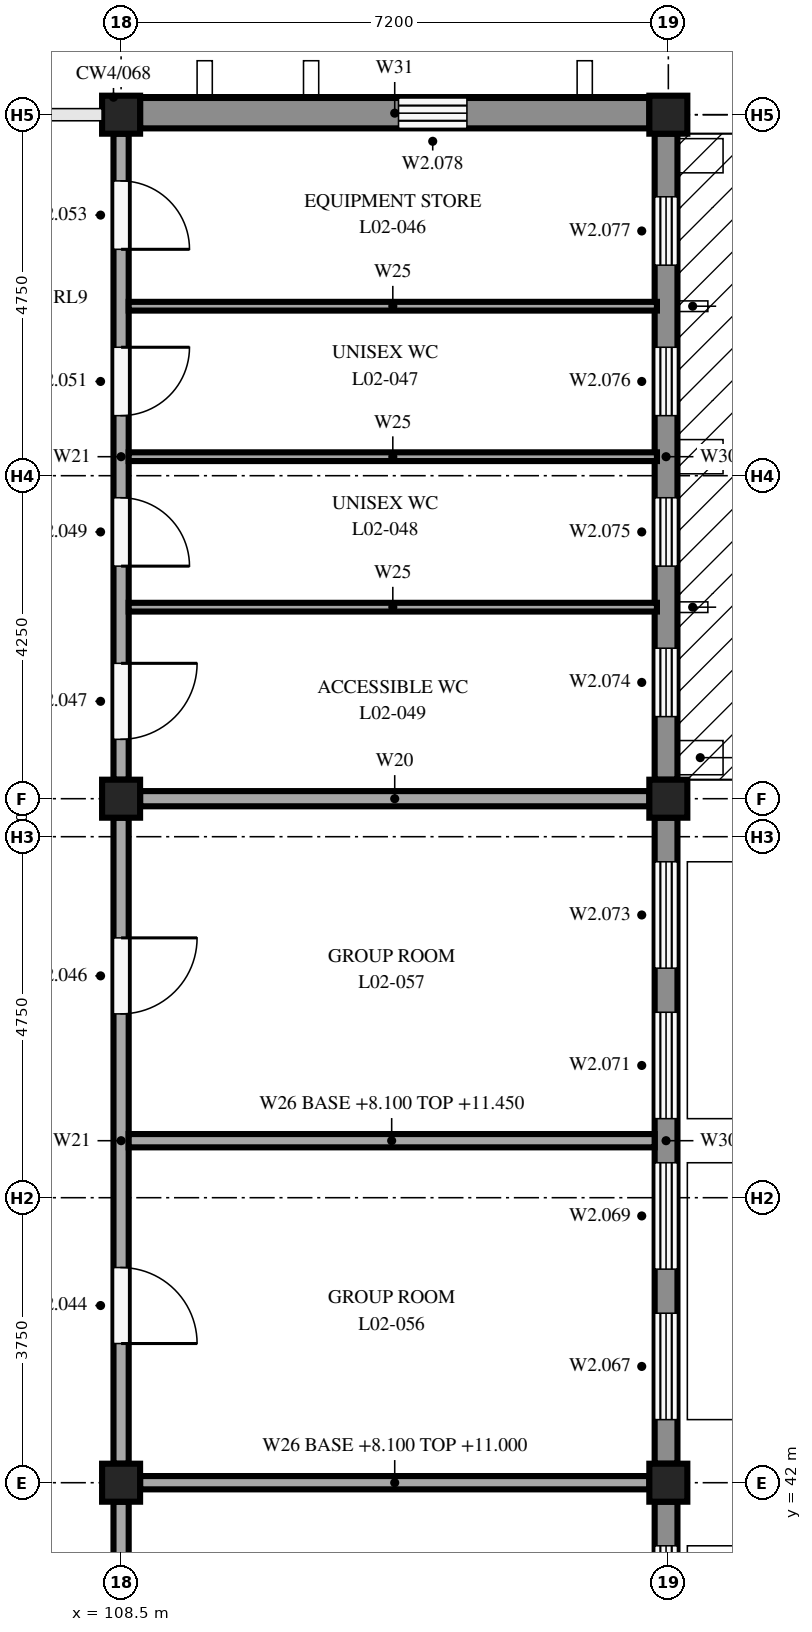
"""IFC4 building model, lengths in metres.
Left out: names, types, materials, properties, quantities, classifications, styles, units other than length and angle.
Written with IfcOpenShell. Run it as: python <this file> out.ifc"""

import sys

from ifc_helpers import new_model, si_unit, direction, frame, frame_2d, origin, origin_2d, place, context, subcontext, project, spatial, rectangle, extrude, element, fill, save


model = new_model("IFC4")
c1 = context("Model", 3, precision=1e-05, world=origin(), true_north=direction((0.0, 1.0)))
c2 = subcontext(c1, "Body", "Model", "MODEL_VIEW")
j1 = project(units=[si_unit("LENGTHUNIT", "METRE"), si_unit("PLANEANGLEUNIT", "RADIAN")], contexts=[c1])
p1 = place(None, origin())
s1 = spatial("IfcSite", under=j1, at=p1, CompositionType="ELEMENT")
p2 = place(p1, origin())
s2 = spatial("IfcBuilding", under=s1, at=p2, CompositionType="ELEMENT")
p3 = place(p2, frame((0.0, 0.0, 8.1)))
s3 = spatial("IfcBuildingStorey", under=s2, at=p3, CompositionType="ELEMENT", Elevation=8.1)
for number, where, z_axis, x_axis in (
    (1, (108.5, 42.0, 0.0), (0.0, 0.0, 1.0), (1.0, 0.0, 0.0)),
    (2, (108.5, 51.0, 0.0), (0.0, 0.0, 1.0), (1.0, 0.0, 0.0)),
    (3, (108.5, 60.0, 0.0), (0.0, 0.0, 1.0), (1.0, 0.0, 0.0)),
    (4, (115.7, 42.0, 0.0), (0.0, 0.0, 1.0), (1.0, 0.0, 0.0)),
    (5, (115.7, 51.0, 0.0), (0.0, 0.0, 1.0), (1.0, 0.0, 0.0)),
    (6, (115.7, 60.0, 0.0), (0.0, 0.0, 1.0), (1.0, 0.0, 0.0)),
):
    element("IfcColumn", number, at=place(p3, frame(where, z_axis=z_axis, x_axis=x_axis)), inside=s3, PredefinedType="COLUMN", context=c2, shape_type="SweptSolid", body=[
        extrude(rectangle(XDim=0.5, YDim=0.5, at=origin_2d()), origin(), (0.0, 0.0, 1.0), 3.35),
    ])
p4 = place(p3, frame((115.67, 41.75, 0.0), z_axis=(0.0, 0.0, 1.0), x_axis=(0.0, -1.0, 0.0)))
e7 = element("IfcWall", 7, at=p4, inside=s3, PredefinedType="STANDARD", context=c2, shape_type="SweptSolid", body=[
    extrude(rectangle(XDim=8.5, YDim=0.3, at=frame_2d((4.25, 0.0))), origin(), (0.0, 0.0, 1.0), 2.85),
])
p5 = place(p4, frame((6.52, 0.0, 0.6)))
e8 = element("IfcOpeningElement", 8, at=p5, cuts=e7, PredefinedType="OPENING", context=c2, shape_type="SweptSolid", body=[
    extrude(rectangle(XDim=1.4, YDim=2.2, at=frame_2d((0.7, 1.1))), frame((0.0, 0.16, 0.0), z_axis=(0.0, -1.0, 0.0), x_axis=(1.0, 0.0, 0.0)), (0.0, 0.0, 1.0), 0.32),
])
p6 = place(p4, frame((4.54, 0.0, 0.6)))
e9 = element("IfcOpeningElement", 9, at=p6, cuts=e7, PredefinedType="OPENING", context=c2, shape_type="SweptSolid", body=[
    extrude(rectangle(XDim=1.4, YDim=2.2, at=frame_2d((0.7, 1.1))), frame((0.0, 0.16, 0.0), z_axis=(0.0, -1.0, 0.0), x_axis=(1.0, 0.0, 0.0)), (0.0, 0.0, 1.0), 0.32),
])
p7 = place(p4, frame((2.56, 0.0, 0.6)))
e10 = element("IfcOpeningElement", 10, at=p7, cuts=e7, PredefinedType="OPENING", context=c2, shape_type="SweptSolid", body=[
    extrude(rectangle(XDim=1.4, YDim=2.2, at=frame_2d((0.7, 1.1))), frame((0.0, 0.16, 0.0), z_axis=(0.0, -1.0, 0.0), x_axis=(1.0, 0.0, 0.0)), (0.0, 0.0, 1.0), 0.32),
])
p8 = place(p4, frame((0.58, 0.0, 0.6)))
e11 = element("IfcOpeningElement", 11, at=p8, cuts=e7, PredefinedType="OPENING", context=c2, shape_type="SweptSolid", body=[
    extrude(rectangle(XDim=1.4, YDim=2.2, at=frame_2d((0.7, 1.1))), frame((0.0, 0.16, 0.0), z_axis=(0.0, -1.0, 0.0), x_axis=(1.0, 0.0, 0.0)), (0.0, 0.0, 1.0), 0.32),
])
p9 = place(p3, frame((115.67, 50.75, 0.0), z_axis=(0.0, 0.0, 1.0), x_axis=(0.0, -1.0, 0.0)))
e12 = element("IfcWall", 12, at=p9, inside=s3, PredefinedType="STANDARD", context=c2, shape_type="SweptSolid", body=[
    extrude(rectangle(XDim=8.5, YDim=0.3, at=frame_2d((4.25, 0.0))), origin(), (0.0, 0.0, 1.0), 2.85),
])
p10 = place(p9, frame((6.52, 0.0, 0.6)))
e13 = element("IfcOpeningElement", 13, at=p10, cuts=e12, PredefinedType="OPENING", context=c2, shape_type="SweptSolid", body=[
    extrude(rectangle(XDim=1.4, YDim=2.2, at=frame_2d((0.7, 1.1))), frame((0.0, 0.16, 0.0), z_axis=(0.0, -1.0, 0.0), x_axis=(1.0, 0.0, 0.0)), (0.0, 0.0, 1.0), 0.32),
])
p11 = place(p9, frame((4.54, 0.0, 0.6)))
e14 = element("IfcOpeningElement", 14, at=p11, cuts=e12, PredefinedType="OPENING", context=c2, shape_type="SweptSolid", body=[
    extrude(rectangle(XDim=1.4, YDim=2.2, at=frame_2d((0.7, 1.1))), frame((0.0, 0.16, 0.0), z_axis=(0.0, -1.0, 0.0), x_axis=(1.0, 0.0, 0.0)), (0.0, 0.0, 1.0), 0.32),
])
p12 = place(p9, frame((2.56, 0.0, 0.6)))
e15 = element("IfcOpeningElement", 15, at=p12, cuts=e12, PredefinedType="OPENING", context=c2, shape_type="SweptSolid", body=[
    extrude(rectangle(XDim=1.4, YDim=2.2, at=frame_2d((0.7, 1.1))), frame((0.0, 0.16, 0.0), z_axis=(0.0, -1.0, 0.0), x_axis=(1.0, 0.0, 0.0)), (0.0, 0.0, 1.0), 0.32),
])
p13 = place(p9, frame((0.58, 0.0, 0.6)))
e16 = element("IfcOpeningElement", 16, at=p13, cuts=e12, PredefinedType="OPENING", context=c2, shape_type="SweptSolid", body=[
    extrude(rectangle(XDim=1.4, YDim=2.2, at=frame_2d((0.7, 1.1))), frame((0.0, 0.16, 0.0), z_axis=(0.0, -1.0, 0.0), x_axis=(1.0, 0.0, 0.0)), (0.0, 0.0, 1.0), 0.32),
])
p14 = place(p3, frame((115.67, 59.75, 0.0), z_axis=(0.0, 0.0, 1.0), x_axis=(0.0, -1.0, 0.0)))
e17 = element("IfcWall", 17, at=p14, inside=s3, PredefinedType="STANDARD", context=c2, shape_type="SweptSolid", body=[
    extrude(rectangle(XDim=8.5, YDim=0.3, at=frame_2d((4.25, 0.0))), origin(), (0.0, 0.0, 1.0), 2.85),
])
p15 = place(p14, frame((6.77, 0.0, 1.6)))
e18 = element("IfcOpeningElement", 18, at=p15, cuts=e17, PredefinedType="OPENING", context=c2, shape_type="SweptSolid", body=[
    extrude(rectangle(XDim=0.9, YDim=1.0, at=frame_2d((0.45, 0.5))), frame((0.0, 0.16, 0.0), z_axis=(0.0, -1.0, 0.0), x_axis=(1.0, 0.0, 0.0)), (0.0, 0.0, 1.0), 0.32),
])
p16 = place(p14, frame((4.79, 0.0, 1.6)))
e19 = element("IfcOpeningElement", 19, at=p16, cuts=e17, PredefinedType="OPENING", context=c2, shape_type="SweptSolid", body=[
    extrude(rectangle(XDim=0.9, YDim=1.0, at=frame_2d((0.45, 0.5))), frame((0.0, 0.16, 0.0), z_axis=(0.0, -1.0, 0.0), x_axis=(1.0, 0.0, 0.0)), (0.0, 0.0, 1.0), 0.32),
])
p17 = place(p14, frame((2.81, 0.0, 1.6)))
e20 = element("IfcOpeningElement", 20, at=p17, cuts=e17, PredefinedType="OPENING", context=c2, shape_type="SweptSolid", body=[
    extrude(rectangle(XDim=0.9, YDim=1.0, at=frame_2d((0.45, 0.5))), frame((0.0, 0.16, 0.0), z_axis=(0.0, -1.0, 0.0), x_axis=(1.0, 0.0, 0.0)), (0.0, 0.0, 1.0), 0.32),
])
p18 = place(p14, frame((0.83, 0.0, 1.6)))
e21 = element("IfcOpeningElement", 21, at=p18, cuts=e17, PredefinedType="OPENING", context=c2, shape_type="SweptSolid", body=[
    extrude(rectangle(XDim=0.9, YDim=1.0, at=frame_2d((0.45, 0.5))), frame((0.0, 0.16, 0.0), z_axis=(0.0, -1.0, 0.0), x_axis=(1.0, 0.0, 0.0)), (0.0, 0.0, 1.0), 0.32),
])
p19 = place(p3, frame((108.75, 60.02, 0.0), z_axis=(0.0, 0.0, 1.0), x_axis=(1.0, 0.0, 0.0)))
e22 = element("IfcWall", 22, at=p19, inside=s3, PredefinedType="STANDARD", context=c2, shape_type="SweptSolid", body=[
    extrude(rectangle(XDim=6.7, YDim=0.4, at=frame_2d((3.35, 0.0))), origin(), (0.0, 0.0, 1.0), 2.9),
])
p20 = place(p19, frame((3.4, 0.0, 1.6)))
e23 = element("IfcOpeningElement", 23, at=p20, cuts=e22, PredefinedType="OPENING", context=c2, shape_type="SweptSolid", body=[
    extrude(rectangle(XDim=0.9, YDim=1.0, at=frame_2d((0.45, 0.5))), frame((0.0, 0.21, 0.0), z_axis=(0.0, -1.0, 0.0), x_axis=(1.0, 0.0, 0.0)), (0.0, 0.0, 1.0), 0.42),
])
p21 = place(p3, frame((108.5, 59.75, 0.0), z_axis=(0.0, 0.0, 1.0), x_axis=(0.0, -1.0, 0.0)))
e24 = element("IfcWall", 24, at=p21, inside=s3, PredefinedType="PARTITIONING", context=c2, shape_type="SweptSolid", body=[
    extrude(rectangle(XDim=8.5, YDim=0.2, at=frame_2d((4.25, 0.0))), origin(), (0.0, 0.0, 1.0), 2.9),
])
p22 = place(p21, frame((6.969, 0.0, 0.0)))
e25 = element("IfcOpeningElement", 25, at=p22, cuts=e24, PredefinedType="OPENING", context=c2, shape_type="SweptSolid", body=[
    extrude(rectangle(XDim=1.0, YDim=2.1, at=frame_2d((0.5, 1.05))), frame((0.0, 0.11, 0.0), z_axis=(0.0, -1.0, 0.0), x_axis=(1.0, 0.0, 0.0)), (0.0, 0.0, 1.0), 0.22),
])
p23 = place(p21, frame((4.79, 0.0, 0.0)))
e26 = element("IfcOpeningElement", 26, at=p23, cuts=e24, PredefinedType="OPENING", context=c2, shape_type="SweptSolid", body=[
    extrude(rectangle(XDim=0.9, YDim=2.1, at=frame_2d((0.45, 1.05))), frame((0.0, 0.11, 0.0), z_axis=(0.0, -1.0, 0.0), x_axis=(1.0, 0.0, 0.0)), (0.0, 0.0, 1.0), 0.22),
])
p24 = place(p21, frame((2.81, 0.0, 0.0)))
e27 = element("IfcOpeningElement", 27, at=p24, cuts=e24, PredefinedType="OPENING", context=c2, shape_type="SweptSolid", body=[
    extrude(rectangle(XDim=0.9, YDim=2.1, at=frame_2d((0.45, 1.05))), frame((0.0, 0.11, 0.0), z_axis=(0.0, -1.0, 0.0), x_axis=(1.0, 0.0, 0.0)), (0.0, 0.0, 1.0), 0.22),
])
p25 = place(p21, frame((0.621, 0.0, 0.0)))
e28 = element("IfcOpeningElement", 28, at=p25, cuts=e24, PredefinedType="OPENING", context=c2, shape_type="SweptSolid", body=[
    extrude(rectangle(XDim=0.9, YDim=2.1, at=frame_2d((0.45, 1.05))), frame((0.0, 0.11, 0.0), z_axis=(0.0, -1.0, 0.0), x_axis=(1.0, 0.0, 0.0)), (0.0, 0.0, 1.0), 0.22),
])
p26 = place(p3, frame((108.75, 51.0, 0.0), z_axis=(0.0, 0.0, 1.0), x_axis=(1.0, 0.0, 0.0)))
e29 = element("IfcWall", 29, at=p26, inside=s3, PredefinedType="PARTITIONING", context=c2, shape_type="SweptSolid", body=[
    extrude(rectangle(XDim=6.7, YDim=0.2, at=frame_2d((3.35, 0.0))), origin(), (0.0, 0.0, 1.0), 2.9),
])
for number, where, z_axis, x_axis in (
    (30, (108.6, 57.48, 0.0), (0.0, 0.0, 1.0), (1.0, 0.0, 0.0)),
    (31, (108.6, 55.5, 0.0), (0.0, 0.0, 1.0), (1.0, 0.0, 0.0)),
    (32, (108.6, 53.52, 0.0), (0.0, 0.0, 1.0), (1.0, 0.0, 0.0)),
):
    element("IfcWall", number, at=place(p3, frame(where, z_axis=z_axis, x_axis=x_axis)), inside=s3, PredefinedType="PARTITIONING", context=c2, shape_type="SweptSolid", body=[
        extrude(rectangle(XDim=6.95, YDim=0.115, at=frame_2d((3.475, 0.0))), origin(), (0.0, 0.0, 1.0), 3.35),
    ])
p27 = place(p3, frame((108.5, 41.75, 0.0), z_axis=(0.0, 0.0, 1.0), x_axis=(0.0, -1.0, 0.0)))
e33 = element("IfcWall", 33, at=p27, inside=s3, PredefinedType="PARTITIONING", context=c2, shape_type="SweptSolid", body=[
    extrude(rectangle(XDim=8.5, YDim=0.2, at=frame_2d((4.25, 0.0))), origin(), (0.0, 0.0, 1.0), 2.9),
])
p28 = place(p27, frame((3.75, 0.0, 0.0)))
e34 = element("IfcOpeningElement", 34, at=p28, cuts=e33, PredefinedType="OPENING", context=c2, shape_type="SweptSolid", body=[
    extrude(rectangle(XDim=1.0, YDim=2.1, at=frame_2d((0.5, 1.05))), frame((0.0, 0.11, 0.0), z_axis=(0.0, -1.0, 0.0), x_axis=(1.0, 0.0, 0.0)), (0.0, 0.0, 1.0), 0.22),
])
p29 = place(p3, frame((108.5, 50.75, 0.0), z_axis=(0.0, 0.0, 1.0), x_axis=(0.0, -1.0, 0.0)))
e35 = element("IfcWall", 35, at=p29, inside=s3, PredefinedType="PARTITIONING", context=c2, shape_type="SweptSolid", body=[
    extrude(rectangle(XDim=8.5, YDim=0.2, at=frame_2d((4.25, 0.0))), origin(), (0.0, 0.0, 1.0), 2.9),
])
p30 = place(p29, frame((5.919, 0.0, 0.0)))
e36 = element("IfcOpeningElement", 36, at=p30, cuts=e35, PredefinedType="OPENING", context=c2, shape_type="SweptSolid", body=[
    extrude(rectangle(XDim=1.0, YDim=2.1, at=frame_2d((0.5, 1.05))), frame((0.0, 0.11, 0.0), z_axis=(0.0, -1.0, 0.0), x_axis=(1.0, 0.0, 0.0)), (0.0, 0.0, 1.0), 0.22),
])
p31 = place(p29, frame((1.581, 0.0, 0.0)))
e37 = element("IfcOpeningElement", 37, at=p31, cuts=e35, PredefinedType="OPENING", context=c2, shape_type="SweptSolid", body=[
    extrude(rectangle(XDim=1.0, YDim=2.1, at=frame_2d((0.5, 1.05))), frame((0.0, 0.11, 0.0), z_axis=(0.0, -1.0, 0.0), x_axis=(1.0, 0.0, 0.0)), (0.0, 0.0, 1.0), 0.22),
])
p32 = place(p3, frame((108.75, 42.0, 0.0), z_axis=(0.0, 0.0, 1.0), x_axis=(1.0, 0.0, 0.0)))
e38 = element("IfcWall", 38, at=p32, inside=s3, PredefinedType="PARTITIONING", context=c2, shape_type="SweptSolid", body=[
    extrude(rectangle(XDim=6.7, YDim=0.175, at=frame_2d((3.35, 0.0))), origin(), (0.0, 0.0, 1.0), 2.9),
])
p33 = place(p3, frame((108.6, 46.5, 0.0), z_axis=(0.0, 0.0, 1.0), x_axis=(1.0, 0.0, 0.0)))
e39 = element("IfcWall", 39, at=p33, inside=s3, PredefinedType="PARTITIONING", context=c2, shape_type="SweptSolid", body=[
    extrude(rectangle(XDim=6.92, YDim=0.175, at=frame_2d((3.46, 0.0))), origin(), (0.0, 0.0, 1.0), 3.35),
])
p34 = place(p8, origin())
e40 = element("IfcWindow", 40, at=p34, inside=s3, PartitioningType="DOUBLE_PANEL_VERTICAL", PredefinedType="WINDOW", context=c2, shape_type="SweptSolid", body=[
    extrude(rectangle(XDim=1.4, YDim=2.2, at=frame_2d((0.7, 1.1))), frame((0.0, 0.03, 0.0), z_axis=(0.0, -1.0, 0.0), x_axis=(1.0, 0.0, 0.0)), (0.0, 0.0, 1.0), 0.06),
])
fill(e11, e40)
p35 = place(p10, origin())
e41 = element("IfcWindow", 41, at=p35, inside=s3, PartitioningType="DOUBLE_PANEL_VERTICAL", PredefinedType="WINDOW", context=c2, shape_type="SweptSolid", body=[
    extrude(rectangle(XDim=1.4, YDim=2.2, at=frame_2d((0.7, 1.1))), frame((0.0, 0.03, 0.0), z_axis=(0.0, -1.0, 0.0), x_axis=(1.0, 0.0, 0.0)), (0.0, 0.0, 1.0), 0.06),
])
fill(e13, e41)
p36 = place(p11, origin())
e42 = element("IfcWindow", 42, at=p36, inside=s3, PartitioningType="DOUBLE_PANEL_VERTICAL", PredefinedType="WINDOW", context=c2, shape_type="SweptSolid", body=[
    extrude(rectangle(XDim=1.4, YDim=2.2, at=frame_2d((0.7, 1.1))), frame((0.0, 0.03, 0.0), z_axis=(0.0, -1.0, 0.0), x_axis=(1.0, 0.0, 0.0)), (0.0, 0.0, 1.0), 0.06),
])
fill(e14, e42)
p37 = place(p12, origin())
e43 = element("IfcWindow", 43, at=p37, inside=s3, PartitioningType="DOUBLE_PANEL_VERTICAL", PredefinedType="WINDOW", context=c2, shape_type="SweptSolid", body=[
    extrude(rectangle(XDim=1.4, YDim=2.2, at=frame_2d((0.7, 1.1))), frame((0.0, 0.03, 0.0), z_axis=(0.0, -1.0, 0.0), x_axis=(1.0, 0.0, 0.0)), (0.0, 0.0, 1.0), 0.06),
])
fill(e15, e43)
p38 = place(p13, origin())
e44 = element("IfcWindow", 44, at=p38, inside=s3, PartitioningType="DOUBLE_PANEL_VERTICAL", PredefinedType="WINDOW", context=c2, shape_type="SweptSolid", body=[
    extrude(rectangle(XDim=1.4, YDim=2.2, at=frame_2d((0.7, 1.1))), frame((0.0, 0.03, 0.0), z_axis=(0.0, -1.0, 0.0), x_axis=(1.0, 0.0, 0.0)), (0.0, 0.0, 1.0), 0.06),
])
fill(e16, e44)
p39 = place(p15, origin())
e45 = element("IfcWindow", 45, at=p39, inside=s3, PartitioningType="SINGLE_PANEL", PredefinedType="WINDOW", context=c2, shape_type="SweptSolid", body=[
    extrude(rectangle(XDim=0.9, YDim=1.0, at=frame_2d((0.45, 0.5))), frame((0.0, 0.03, 0.0), z_axis=(0.0, -1.0, 0.0), x_axis=(1.0, 0.0, 0.0)), (0.0, 0.0, 1.0), 0.06),
])
fill(e18, e45)
p40 = place(p16, origin())
e46 = element("IfcWindow", 46, at=p40, inside=s3, PartitioningType="SINGLE_PANEL", PredefinedType="WINDOW", context=c2, shape_type="SweptSolid", body=[
    extrude(rectangle(XDim=0.9, YDim=1.0, at=frame_2d((0.45, 0.5))), frame((0.0, 0.03, 0.0), z_axis=(0.0, -1.0, 0.0), x_axis=(1.0, 0.0, 0.0)), (0.0, 0.0, 1.0), 0.06),
])
fill(e19, e46)
p41 = place(p17, origin())
e47 = element("IfcWindow", 47, at=p41, inside=s3, PartitioningType="SINGLE_PANEL", PredefinedType="WINDOW", context=c2, shape_type="SweptSolid", body=[
    extrude(rectangle(XDim=0.9, YDim=1.0, at=frame_2d((0.45, 0.5))), frame((0.0, 0.03, 0.0), z_axis=(0.0, -1.0, 0.0), x_axis=(1.0, 0.0, 0.0)), (0.0, 0.0, 1.0), 0.06),
])
fill(e20, e47)
p42 = place(p18, origin())
e48 = element("IfcWindow", 48, at=p42, inside=s3, PartitioningType="SINGLE_PANEL", PredefinedType="WINDOW", context=c2, shape_type="SweptSolid", body=[
    extrude(rectangle(XDim=0.9, YDim=1.0, at=frame_2d((0.45, 0.5))), frame((0.0, 0.03, 0.0), z_axis=(0.0, -1.0, 0.0), x_axis=(1.0, 0.0, 0.0)), (0.0, 0.0, 1.0), 0.06),
])
fill(e21, e48)
p43 = place(p20, origin())
e49 = element("IfcWindow", 49, at=p43, inside=s3, PartitioningType="SINGLE_PANEL", PredefinedType="WINDOW", context=c2, shape_type="SweptSolid", body=[
    extrude(rectangle(XDim=0.9, YDim=1.0, at=frame_2d((0.45, 0.5))), frame((0.0, 0.03, 0.0), z_axis=(0.0, -1.0, 0.0), x_axis=(1.0, 0.0, 0.0)), (0.0, 0.0, 1.0), 0.06),
])
fill(e23, e49)
p44 = place(p22, origin())
e50 = element("IfcDoor", 50, at=p44, inside=s3, OperationType="SINGLE_SWING_LEFT", PredefinedType="DOOR", context=c2, shape_type="SweptSolid", body=[
    extrude(rectangle(XDim=1.0, YDim=2.1, at=frame_2d((0.5, 1.05))), frame((0.0, 0.025, 0.0), z_axis=(0.0, -1.0, 0.0), x_axis=(1.0, 0.0, 0.0)), (0.0, 0.0, 1.0), 0.05),
])
fill(e25, e50)
p45 = place(p23, origin())
e51 = element("IfcDoor", 51, at=p45, inside=s3, OperationType="SINGLE_SWING_RIGHT", PredefinedType="DOOR", context=c2, shape_type="SweptSolid", body=[
    extrude(rectangle(XDim=0.9, YDim=2.1, at=frame_2d((0.45, 1.05))), frame((0.0, 0.025, 0.0), z_axis=(0.0, -1.0, 0.0), x_axis=(1.0, 0.0, 0.0)), (0.0, 0.0, 1.0), 0.05),
])
fill(e26, e51)
p46 = place(p24, origin())
e52 = element("IfcDoor", 52, at=p46, inside=s3, OperationType="SINGLE_SWING_LEFT", PredefinedType="DOOR", context=c2, shape_type="SweptSolid", body=[
    extrude(rectangle(XDim=0.9, YDim=2.1, at=frame_2d((0.45, 1.05))), frame((0.0, 0.025, 0.0), z_axis=(0.0, -1.0, 0.0), x_axis=(1.0, 0.0, 0.0)), (0.0, 0.0, 1.0), 0.05),
])
fill(e27, e52)
p47 = place(p25, origin())
e53 = element("IfcDoor", 53, at=p47, inside=s3, OperationType="SINGLE_SWING_RIGHT", PredefinedType="DOOR", context=c2, shape_type="SweptSolid", body=[
    extrude(rectangle(XDim=0.9, YDim=2.1, at=frame_2d((0.45, 1.05))), frame((0.0, 0.025, 0.0), z_axis=(0.0, -1.0, 0.0), x_axis=(1.0, 0.0, 0.0)), (0.0, 0.0, 1.0), 0.05),
])
fill(e28, e53)
p48 = place(p30, origin())
e54 = element("IfcDoor", 54, at=p48, inside=s3, OperationType="SINGLE_SWING_RIGHT", PredefinedType="DOOR", context=c2, shape_type="SweptSolid", body=[
    extrude(rectangle(XDim=1.0, YDim=2.1, at=frame_2d((0.5, 1.05))), frame((0.0, 0.025, 0.0), z_axis=(0.0, -1.0, 0.0), x_axis=(1.0, 0.0, 0.0)), (0.0, 0.0, 1.0), 0.05),
])
fill(e36, e54)
p49 = place(p31, origin())
e55 = element("IfcDoor", 55, at=p49, inside=s3, OperationType="SINGLE_SWING_LEFT", PredefinedType="DOOR", context=c2, shape_type="SweptSolid", body=[
    extrude(rectangle(XDim=1.0, YDim=2.1, at=frame_2d((0.5, 1.05))), frame((0.0, 0.025, 0.0), z_axis=(0.0, -1.0, 0.0), x_axis=(1.0, 0.0, 0.0)), (0.0, 0.0, 1.0), 0.05),
])
fill(e37, e55)
save(model, sys.argv[1])
